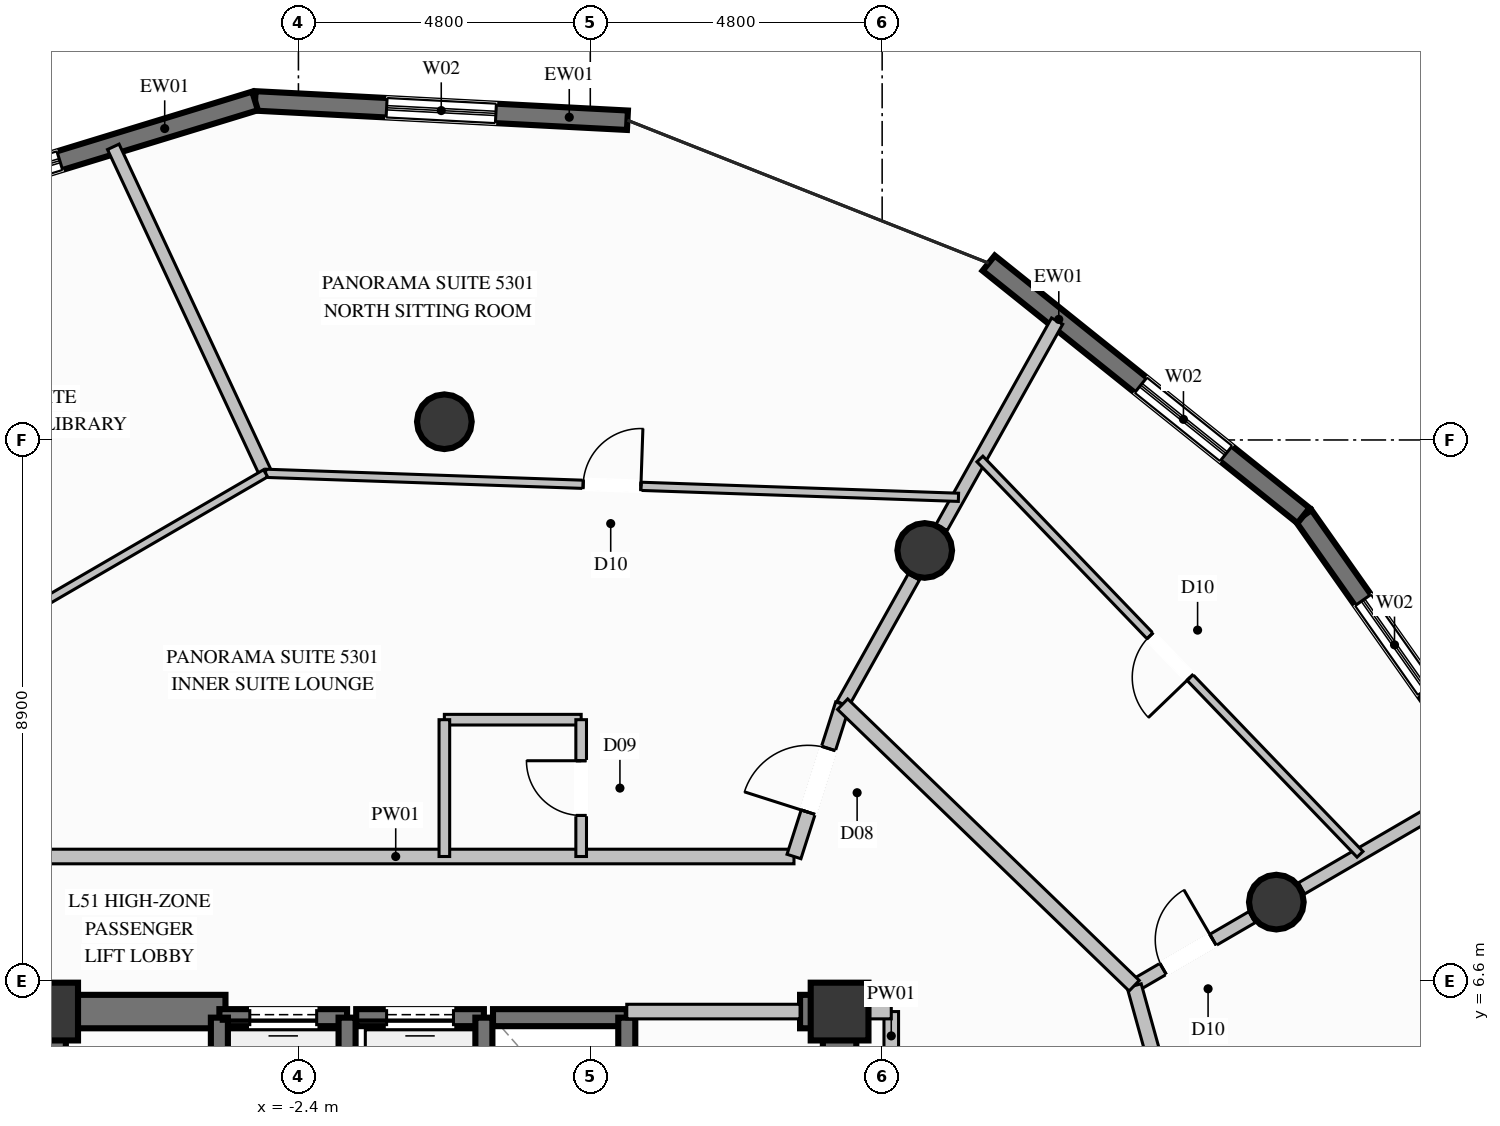
"""IFC4 building model, lengths in metres.
Left out: names, types, materials, properties, quantities, classifications, styles, units other than length and angle.
Written with IfcOpenShell. Run it as: python <this file> out.ifc"""

import sys

from ifc_helpers import new_model, si_unit, direction, frame, frame_2d, origin, origin_2d, place, context, subcontext, project, spatial, rectangle, circle, extrude, element, fill, save


model = new_model("IFC4")
c1 = context("Model", 3, precision=1e-05, world=origin(), true_north=direction((0.0, 1.0)))
c2 = subcontext(c1, "Body", "Model", "MODEL_VIEW")
j1 = project(units=[si_unit("LENGTHUNIT", "METRE"), si_unit("PLANEANGLEUNIT", "RADIAN")], contexts=[c1])
p1 = place(None, origin())
s1 = spatial("IfcSite", under=j1, at=p1, CompositionType="ELEMENT")
p2 = place(p1, origin())
s2 = spatial("IfcBuilding", under=s1, at=p2, CompositionType="ELEMENT")
p3 = place(p2, frame((0.0, 0.0, 198.4)))
s3 = spatial("IfcBuildingStorey", under=s2, at=p3, CompositionType="ELEMENT", Elevation=198.4)
for number, where, z_axis, x_axis in (
    (1, (6.5, 6.1, 0.0), (0.0, 0.0, 1.0), (1.0, 0.0, 0.0)),
    (2, (-6.5, 6.1, 0.0), (0.0, 0.0, 1.0), (1.0, 0.0, 0.0)),
):
    element("IfcColumn", number, at=place(p3, frame(where, z_axis=z_axis, x_axis=x_axis)), inside=s3, PredefinedType="COLUMN", context=c2, shape_type="SweptSolid", body=[
        extrude(rectangle(XDim=0.95, YDim=0.95, at=origin_2d()), origin(), (0.0, 0.0, 1.0), 3.6),
    ])
p4 = place(p3, frame((-6.225, 6.1, 0.0), z_axis=(0.0, 0.0, 1.0), x_axis=(1.0, 0.0, 0.0)))
e3 = element("IfcWall", 3, at=p4, inside=s3, PredefinedType="SHEAR", context=c2, shape_type="SweptSolid", body=[
    extrude(rectangle(XDim=2.625, YDim=0.55, at=frame_2d((1.312, 0.0))), origin(), (0.0, 0.0, 1.0), 3.6),
])
p5 = place(p3, frame((5.85, 6.1, 0.0), z_axis=(0.0, 0.0, 1.0), x_axis=(1.0, 0.0, 0.0)))
e4 = element("IfcWall", 4, at=p5, inside=s3, PredefinedType="SHEAR", context=c2, shape_type="SweptSolid", body=[
    extrude(rectangle(XDim=0.375, YDim=0.55, at=frame_2d((0.188, 0.0))), origin(), (0.0, 0.0, 1.0), 3.6),
])
p6 = place(p3, frame((-6.5, 2.35, 0.0), z_axis=(0.0, 0.0, 1.0), x_axis=(0.0, 1.0, 0.0)))
e5 = element("IfcWall", 5, at=p6, inside=s3, PredefinedType="SHEAR", context=c2, shape_type="SweptSolid", body=[
    extrude(rectangle(XDim=4.025, YDim=0.55, at=frame_2d((2.012, 0.0))), origin(), (0.0, 0.0, 1.0), 3.6),
])
p7 = place(p3, frame((6.5, 3.35, 0.0), z_axis=(0.0, 0.0, 1.0), x_axis=(0.0, 1.0, 0.0)))
e6 = element("IfcWall", 6, at=p7, inside=s3, PredefinedType="SHEAR", context=c2, shape_type="SweptSolid", body=[
    extrude(rectangle(XDim=3.025, YDim=0.55, at=frame_2d((1.512, 0.0))), origin(), (0.0, 0.0, 1.0), 3.6),
])
for number, where, z_axis, x_axis in (
    (7, (13.683, 7.9, 0.0), (0.0, 0.0, 1.0), (1.0, 0.0, 0.0)),
    (8, (7.9, 13.683, 0.0), (0.0, 0.0, 1.0), (1.0, 0.0, 0.0)),
    (9, (0.0, 15.8, 0.0), (0.0, 0.0, 1.0), (1.0, 0.0, 0.0)),
):
    element("IfcColumn", number, at=place(p3, frame(where, z_axis=z_axis, x_axis=x_axis)), inside=s3, PredefinedType="COLUMN", context=c2, shape_type="SweptSolid", body=[
        extrude(circle(Radius=0.45, at=origin_2d()), origin(), (0.0, 0.0, 1.0), 3.6),
    ])
p8 = place(p3, frame((14.13, 14.256, 0.0), z_axis=(0.0, 0.0, 1.0), x_axis=(0.575790136357, -0.817597528662, 0.0)))
e10 = element("IfcWall", 10, at=p8, inside=s3, PredefinedType="SOLIDWALL", context=c2, shape_type="SweptSolid", body=[
    extrude(rectangle(XDim=6.786, YDim=0.32, at=frame_2d((3.393, 0.0))), origin(), (0.0, 0.0, 1.0), 3.36),
])
p9 = place(p8, frame((1.699, 0.0, 0.35)))
e11 = element("IfcOpeningElement", 11, at=p9, cuts=e10, PredefinedType="OPENING", context=c2, shape_type="SweptSolid", body=[
    extrude(rectangle(XDim=1.8, YDim=2.6, at=frame_2d((0.9, 1.3))), frame((0.0, 0.17, 0.0), z_axis=(0.0, -1.0, 0.0), x_axis=(1.0, 0.0, 0.0)), (0.0, 0.0, 1.0), 0.34),
])
p10 = place(p3, frame((8.952, 18.408, 0.0), z_axis=(0.0, 0.0, 1.0), x_axis=(0.780172101925, -0.625564937778, 0.0)))
e12 = element("IfcWall", 12, at=p10, inside=s3, PredefinedType="SOLIDWALL", context=c2, shape_type="SweptSolid", body=[
    extrude(rectangle(XDim=6.637, YDim=0.32, at=frame_2d((3.318, 0.0))), origin(), (0.0, 0.0, 1.0), 3.36),
])
p11 = place(p10, frame((3.206, 0.0, 0.35)))
e13 = element("IfcOpeningElement", 13, at=p11, cuts=e12, PredefinedType="OPENING", context=c2, shape_type="SweptSolid", body=[
    extrude(rectangle(XDim=1.8, YDim=2.6, at=frame_2d((0.9, 1.3))), frame((0.0, 0.17, 0.0), z_axis=(0.0, -1.0, 0.0), x_axis=(1.0, 0.0, 0.0)), (0.0, 0.0, 1.0), 0.34),
])
p12 = place(p3, frame((-3.113, 21.076, 0.0), z_axis=(0.0, 0.0, 1.0), x_axis=(0.998655620393, -0.051835816367, 0.0)))
e14 = element("IfcWall", 14, at=p12, inside=s3, PredefinedType="SOLIDWALL", context=c2, shape_type="SweptSolid", body=[
    extrude(rectangle(XDim=6.132, YDim=0.32, at=frame_2d((3.066, 0.0))), origin(), (0.0, 0.0, 1.0), 3.36),
])
p13 = place(p12, frame((2.166, 0.0, 0.35)))
e15 = element("IfcOpeningElement", 15, at=p13, cuts=e14, PredefinedType="OPENING", context=c2, shape_type="SweptSolid", body=[
    extrude(rectangle(XDim=1.8, YDim=2.6, at=frame_2d((0.9, 1.3))), frame((0.0, 0.17, 0.0), z_axis=(0.0, -1.0, 0.0), x_axis=(1.0, 0.0, 0.0)), (0.0, 0.0, 1.0), 0.34),
])
p14 = place(p3, frame((-8.819, 19.331, 0.0), z_axis=(0.0, 0.0, 1.0), x_axis=(0.956288023308, 0.292426429171, 0.0)))
e16 = element("IfcWall", 16, at=p14, inside=s3, PredefinedType="SOLIDWALL", context=c2, shape_type="SweptSolid", body=[
    extrude(rectangle(XDim=5.967, YDim=0.32, at=frame_2d((2.983, 0.0))), origin(), (0.0, 0.0, 1.0), 3.36),
])
p15 = place(p14, frame((0.808, 0.0, 0.35)))
e17 = element("IfcOpeningElement", 17, at=p15, cuts=e16, PredefinedType="OPENING", context=c2, shape_type="SweptSolid", body=[
    extrude(rectangle(XDim=1.8, YDim=2.6, at=frame_2d((0.9, 1.3))), frame((0.0, 0.17, 0.0), z_axis=(0.0, -1.0, 0.0), x_axis=(1.0, 0.0, 0.0)), (0.0, 0.0, 1.0), 0.34),
])
p16 = place(p3, frame((-1.6, 6.0, 0.0), z_axis=(0.0, 0.0, 1.0), x_axis=(-1.0, 0.0, 0.0)))
e18 = element("IfcWall", 18, at=p16, inside=s3, PredefinedType="SOLIDWALL", context=c2, shape_type="SweptSolid", body=[
    extrude(rectangle(XDim=2.1, YDim=0.28, at=frame_2d((1.05, 0.0))), origin(), (0.0, 0.0, 1.0), 3.36),
])
p17 = place(p16, frame((0.5, 0.0, 0.0)))
e19 = element("IfcOpeningElement", 19, at=p17, cuts=e18, PredefinedType="OPENING", context=c2, shape_type="SweptSolid", body=[
    extrude(rectangle(XDim=1.1, YDim=2.2, at=frame_2d((0.55, 1.1))), frame((0.0, 0.15, 0.0), z_axis=(0.0, -1.0, 0.0), x_axis=(1.0, 0.0, 0.0)), (0.0, 0.0, 1.0), 0.3),
])
for number, where, z_axis, x_axis in (
    (20, (-3.7, 6.0, 0.0), (0.0, 0.0, 1.0), (0.0, -1.0, 0.0)),
    (21, (-1.6, 3.5, 0.0), (0.0, 0.0, 1.0), (0.0, 1.0, 0.0)),
):
    element("IfcWall", number, at=place(p3, frame(where, z_axis=z_axis, x_axis=x_axis)), inside=s3, PredefinedType="SOLIDWALL", context=c2, shape_type="SweptSolid", body=[
        extrude(rectangle(XDim=2.5, YDim=0.28, at=frame_2d((1.25, 0.0))), origin(), (0.0, 0.0, 1.0), 3.36),
    ])
p18 = place(p3, frame((0.65, 6.0, 0.0), z_axis=(0.0, 0.0, 1.0), x_axis=(-1.0, 0.0, 0.0)))
e22 = element("IfcWall", 22, at=p18, inside=s3, PredefinedType="SOLIDWALL", context=c2, shape_type="SweptSolid", body=[
    extrude(rectangle(XDim=2.1, YDim=0.28, at=frame_2d((1.05, 0.0))), origin(), (0.0, 0.0, 1.0), 3.36),
])
p19 = place(p18, frame((0.5, 0.0, 0.0)))
e23 = element("IfcOpeningElement", 23, at=p19, cuts=e22, PredefinedType="OPENING", context=c2, shape_type="SweptSolid", body=[
    extrude(rectangle(XDim=1.1, YDim=2.2, at=frame_2d((0.55, 1.1))), frame((0.0, 0.15, 0.0), z_axis=(0.0, -1.0, 0.0), x_axis=(1.0, 0.0, 0.0)), (0.0, 0.0, 1.0), 0.3),
])
p20 = place(p3, frame((0.65, 3.5, 0.0), z_axis=(0.0, 0.0, 1.0), x_axis=(0.0, 1.0, 0.0)))
e24 = element("IfcWall", 24, at=p20, inside=s3, PredefinedType="SOLIDWALL", context=c2, shape_type="SweptSolid", body=[
    extrude(rectangle(XDim=2.5, YDim=0.28, at=frame_2d((1.25, 0.0))), origin(), (0.0, 0.0, 1.0), 3.36),
])
p21 = place(p3, frame((3.0, 6.0, 0.0), z_axis=(0.0, 0.0, 1.0), x_axis=(-1.0, 0.0, 0.0)))
e25 = element("IfcWall", 25, at=p21, inside=s3, PredefinedType="SOLIDWALL", context=c2, shape_type="SweptSolid", body=[
    extrude(rectangle(XDim=2.2, YDim=0.28, at=frame_2d((1.1, 0.0))), origin(), (0.0, 0.0, 1.0), 3.36),
])
p22 = place(p3, frame((3.0, 3.5, 0.0), z_axis=(0.0, 0.0, 1.0), x_axis=(0.0, 1.0, 0.0)))
e26 = element("IfcWall", 26, at=p22, inside=s3, PredefinedType="SOLIDWALL", context=c2, shape_type="SweptSolid", body=[
    extrude(rectangle(XDim=2.5, YDim=0.28, at=frame_2d((1.25, 0.0))), origin(), (0.0, 0.0, 1.0), 3.36),
])
p23 = place(p3, frame((-7.35, 8.65, 0.0), z_axis=(0.0, 0.0, 1.0), x_axis=(1.0, 0.0, 0.0)))
e27 = element("IfcWall", 27, at=p23, inside=s3, PredefinedType="PARTITIONING", context=c2, shape_type="SweptSolid", body=[
    extrude(rectangle(XDim=13.1, YDim=0.24, at=frame_2d((6.55, 0.0))), origin(), (0.0, 0.0, 1.0), 3.36),
])
p24 = place(p3, frame((3.0, 6.1, 0.0), z_axis=(0.0, 0.0, 1.0), x_axis=(1.0, 0.0, 0.0)))
e28 = element("IfcWall", 28, at=p24, inside=s3, PredefinedType="PARTITIONING", context=c2, shape_type="SweptSolid", body=[
    extrude(rectangle(XDim=2.85, YDim=0.24, at=frame_2d((1.425, 0.0))), origin(), (0.0, 0.0, 1.0), 2.445),
])
p25 = place(p3, frame((7.35, 5.3, 0.0), z_axis=(0.0, 0.0, 1.0), x_axis=(0.0, 1.0, 0.0)))
e29 = element("IfcWall", 29, at=p25, inside=s3, PredefinedType="PARTITIONING", context=c2, shape_type="SweptSolid", body=[
    extrude(rectangle(XDim=0.8, YDim=0.24, at=frame_2d((0.4, 0.0))), origin(), (0.0, 0.0, 1.0), 2.445),
])
p26 = place(p3, frame((6.5, 6.1, 0.0), z_axis=(0.0, 0.0, 1.0), x_axis=(1.0, 0.0, 0.0)))
e30 = element("IfcWall", 30, at=p26, inside=s3, PredefinedType="PARTITIONING", context=c2, shape_type="SweptSolid", body=[
    extrude(rectangle(XDim=0.85, YDim=0.24, at=frame_2d((0.425, 0.0))), origin(), (0.0, 0.0, 1.0), 2.876),
])
p27 = place(p3, frame((11.345, 6.525, 0.0), z_axis=(0.0, 0.0, 1.0), x_axis=(0.864228712324, 0.5030991282, 0.0)))
e31 = element("IfcWall", 31, at=p27, inside=s3, PredefinedType="PARTITIONING", context=c2, shape_type="SweptSolid", body=[
    extrude(rectangle(XDim=2.242, YDim=0.21, at=frame_2d((1.121, 0.0))), origin(), (0.0, 0.0, 1.0), 2.876),
])
p28 = place(p27, frame((0.55, 0.0, 0.0)))
e32 = element("IfcOpeningElement", 32, at=p28, cuts=e31, PredefinedType="OPENING", context=c2, shape_type="SweptSolid", body=[
    extrude(rectangle(XDim=0.95, YDim=2.1, at=frame_2d((0.475, 1.05))), frame((0.0, 0.115, 0.0), z_axis=(0.0, -1.0, 0.0), x_axis=(1.0, 0.0, 0.0)), (0.0, 0.0, 1.0), 0.23),
])
p29 = place(p3, frame((14.096, 8.125, 0.0), z_axis=(0.0, 0.0, 1.0), x_axis=(0.864327572571, 0.502929266689, 0.0)))
e33 = element("IfcWall", 33, at=p29, inside=s3, PredefinedType="PARTITIONING", context=c2, shape_type="SweptSolid", body=[
    extrude(rectangle(XDim=3.531, YDim=0.21, at=frame_2d((1.766, 0.0))), origin(), (0.0, 0.0, 1.0), 3.36),
])
p30 = place(p3, frame((6.55, 11.155, 0.0), z_axis=(0.0, 0.0, 1.0), x_axis=(0.488535184748, 0.872544195593, 0.0)))
e34 = element("IfcWall", 34, at=p30, inside=s3, PredefinedType="PARTITIONING", context=c2, shape_type="SweptSolid", body=[
    extrude(rectangle(XDim=2.399, YDim=0.21, at=frame_2d((1.199, 0.0))), origin(), (0.0, 0.0, 1.0), 2.876),
])
p31 = place(p3, frame((8.178, 14.062, 0.0), z_axis=(0.0, 0.0, 1.0), x_axis=(0.488561310484, 0.872529567349, 0.0)))
e35 = element("IfcWall", 35, at=p31, inside=s3, PredefinedType="PARTITIONING", context=c2, shape_type="SweptSolid", body=[
    extrude(rectangle(XDim=3.889, YDim=0.21, at=frame_2d((1.944, 0.0))), origin(), (0.0, 0.0, 1.0), 3.36),
])
p32 = place(p3, frame((0.0, 10.9, 0.0), z_axis=(0.0, 0.0, 1.0), x_axis=(1.0, 0.0, 0.0)))
e36 = element("IfcWall", 36, at=p32, inside=s3, PredefinedType="PLUMBINGWALL", context=c2, shape_type="SweptSolid", body=[
    extrude(rectangle(XDim=2.25, YDim=0.175, at=frame_2d((1.125, 0.0))), origin(), (0.0, 0.0, 1.0), 3.042),
])
p33 = place(p3, frame((0.0, 10.9, 0.0), z_axis=(0.0, 0.0, 1.0), x_axis=(0.0, -1.0, 0.0)))
e37 = element("IfcWall", 37, at=p33, inside=s3, PredefinedType="PLUMBINGWALL", context=c2, shape_type="SweptSolid", body=[
    extrude(rectangle(XDim=2.25, YDim=0.175, at=frame_2d((1.125, 0.0))), origin(), (0.0, 0.0, 1.0), 3.36),
])
p34 = place(p3, frame((2.25, 8.65, 0.0), z_axis=(0.0, 0.0, 1.0), x_axis=(0.0, 1.0, 0.0)))
e38 = element("IfcWall", 38, at=p34, inside=s3, PredefinedType="PLUMBINGWALL", context=c2, shape_type="SweptSolid", body=[
    extrude(rectangle(XDim=2.25, YDim=0.175, at=frame_2d((1.125, 0.0))), origin(), (0.0, 0.0, 1.0), 3.36),
])
p35 = place(p34, frame((0.675, 0.0, 0.0)))
e39 = element("IfcOpeningElement", 39, at=p35, cuts=e38, PredefinedType="OPENING", context=c2, shape_type="SweptSolid", body=[
    extrude(rectangle(XDim=0.9, YDim=2.1, at=frame_2d((0.45, 1.05))), frame((0.0, 0.098, 0.0), z_axis=(0.0, -1.0, 0.0), x_axis=(1.0, 0.0, 0.0)), (0.0, 0.0, 1.0), 0.195),
])
p36 = place(p3, frame((5.75, 8.65, 0.0), z_axis=(0.0, 0.0, 1.0), x_axis=(0.304226604656, 0.952599691906, 0.0)))
e40 = element("IfcWall", 40, at=p36, inside=s3, PredefinedType="PARTITIONING", context=c2, shape_type="SweptSolid", body=[
    extrude(rectangle(XDim=2.63, YDim=0.24, at=frame_2d((1.315, 0.0))), origin(), (0.0, 0.0, 1.0), 3.36),
])
p37 = place(p36, frame((0.765, 0.0, 0.0)))
e41 = element("IfcOpeningElement", 41, at=p37, cuts=e40, PredefinedType="OPENING", context=c2, shape_type="SweptSolid", body=[
    extrude(rectangle(XDim=1.1, YDim=2.3, at=frame_2d((0.55, 1.15))), frame((0.0, 0.13, 0.0), z_axis=(0.0, -1.0, 0.0), x_axis=(1.0, 0.0, 0.0)), (0.0, 0.0, 1.0), 0.26),
])
p38 = place(p3, frame((-2.94, 14.952, 0.0), z_axis=(0.0, 0.0, 1.0), x_axis=(-0.422820045128, 0.906213666548, 0.0)))
e42 = element("IfcWall", 42, at=p38, inside=s3, PredefinedType="PARTITIONING", context=c2, shape_type="SweptSolid", body=[
    extrude(rectangle(XDim=5.925, YDim=0.21, at=frame_2d((2.962, 0.0))), origin(), (0.0, 0.0, 1.0), 3.36),
])
p39 = place(p3, frame((-2.94, 14.952, 0.0), z_axis=(0.0, 0.0, 1.0), x_axis=(0.999399675895, -0.034645170236, 0.0)))
e43 = element("IfcWall", 43, at=p39, inside=s3, PredefinedType="PARTITIONING", context=c2, shape_type="SweptSolid", body=[
    extrude(rectangle(XDim=11.402, YDim=0.135, at=frame_2d((5.701, 0.0))), origin(), (0.0, 0.0, 1.0), 2.929),
])
p40 = place(p39, frame((5.226, 0.0, 0.0)))
e44 = element("IfcOpeningElement", 44, at=p40, cuts=e43, PredefinedType="OPENING", context=c2, shape_type="SweptSolid", body=[
    extrude(rectangle(XDim=0.95, YDim=2.1, at=frame_2d((0.475, 1.05))), frame((0.0, 0.078, 0.0), z_axis=(0.0, -1.0, 0.0), x_axis=(1.0, 0.0, 0.0)), (0.0, 0.0, 1.0), 0.155),
])
p41 = place(p3, frame((-14.387, 8.295, 0.0), z_axis=(0.0, 0.0, 1.0), x_axis=(0.864450171357, 0.502718510939, 0.0)))
e45 = element("IfcWall", 45, at=p41, inside=s3, PredefinedType="PARTITIONING", context=c2, shape_type="SweptSolid", body=[
    extrude(rectangle(XDim=13.242, YDim=0.135, at=frame_2d((6.621, 0.0))), origin(), (0.0, 0.0, 1.0), 2.929),
])
p42 = place(p41, frame((6.146, 0.0, 0.0)))
e46 = element("IfcOpeningElement", 46, at=p42, cuts=e45, PredefinedType="OPENING", context=c2, shape_type="SweptSolid", body=[
    extrude(rectangle(XDim=0.95, YDim=2.1, at=frame_2d((0.475, 1.05))), frame((0.0, 0.078, 0.0), z_axis=(0.0, -1.0, 0.0), x_axis=(1.0, 0.0, 0.0)), (0.0, 0.0, 1.0), 0.155),
])
p43 = place(p3, frame((13.1, 0.2, 0.0), z_axis=(0.0, 0.0, 1.0), x_axis=(-0.26738871748, 0.963588747218, 0.0)))
e47 = element("IfcWall", 47, at=p43, inside=s3, PredefinedType="PARTITIONING", context=c2, shape_type="SweptSolid", body=[
    extrude(rectangle(XDim=6.564, YDim=0.24, at=frame_2d((3.282, 0.0))), origin(), (0.0, 0.0, 1.0), 3.36),
])
p44 = place(p3, frame((11.345, 6.525, 0.0), z_axis=(0.0, 0.0, 1.0), x_axis=(-0.719360436772, 0.694637000172, 0.0)))
e48 = element("IfcWall", 48, at=p44, inside=s3, PredefinedType="PARTITIONING", context=c2, shape_type="SweptSolid", body=[
    extrude(rectangle(XDim=6.666, YDim=0.24, at=frame_2d((3.333, 0.0))), origin(), (0.0, 0.0, 1.0), 3.36),
])
p45 = place(p3, frame((15.059, 8.686, 0.0), z_axis=(0.0, 0.0, 1.0), x_axis=(-0.693110880217, 0.72083098416, 0.0)))
e49 = element("IfcWall", 49, at=p45, inside=s3, PredefinedType="PARTITIONING", context=c2, shape_type="SweptSolid", body=[
    extrude(rectangle(XDim=9.019, YDim=0.135, at=frame_2d((4.509, 0.0))), origin(), (0.0, 0.0, 1.0), 3.36),
])
p46 = place(p45, frame((4.034, 0.0, 0.0)))
e50 = element("IfcOpeningElement", 50, at=p46, cuts=e49, PredefinedType="OPENING", context=c2, shape_type="SweptSolid", body=[
    extrude(rectangle(XDim=0.95, YDim=2.1, at=frame_2d((0.475, 1.05))), frame((0.0, 0.078, 0.0), z_axis=(0.0, -1.0, 0.0), x_axis=(1.0, 0.0, 0.0)), (0.0, 0.0, 1.0), 0.155),
])
p47 = place(p9, origin())
e51 = element("IfcWindow", 51, at=p47, inside=s3, PartitioningType="SINGLE_PANEL", PredefinedType="WINDOW", context=c2, shape_type="SweptSolid", body=[
    extrude(rectangle(XDim=1.8, YDim=2.6, at=frame_2d((0.9, 1.3))), frame((0.0, 0.03, 0.0), z_axis=(0.0, -1.0, 0.0), x_axis=(1.0, 0.0, 0.0)), (0.0, 0.0, 1.0), 0.06),
])
fill(e11, e51)
p48 = place(p11, origin())
e52 = element("IfcWindow", 52, at=p48, inside=s3, PartitioningType="SINGLE_PANEL", PredefinedType="WINDOW", context=c2, shape_type="SweptSolid", body=[
    extrude(rectangle(XDim=1.8, YDim=2.6, at=frame_2d((0.9, 1.3))), frame((0.0, 0.03, 0.0), z_axis=(0.0, -1.0, 0.0), x_axis=(1.0, 0.0, 0.0)), (0.0, 0.0, 1.0), 0.06),
])
fill(e13, e52)
p49 = place(p13, origin())
e53 = element("IfcWindow", 53, at=p49, inside=s3, PartitioningType="SINGLE_PANEL", PredefinedType="WINDOW", context=c2, shape_type="SweptSolid", body=[
    extrude(rectangle(XDim=1.8, YDim=2.6, at=frame_2d((0.9, 1.3))), frame((0.0, 0.03, 0.0), z_axis=(0.0, -1.0, 0.0), x_axis=(1.0, 0.0, 0.0)), (0.0, 0.0, 1.0), 0.06),
])
fill(e15, e53)
p50 = place(p15, origin())
e54 = element("IfcWindow", 54, at=p50, inside=s3, PartitioningType="SINGLE_PANEL", PredefinedType="WINDOW", context=c2, shape_type="SweptSolid", body=[
    extrude(rectangle(XDim=1.8, YDim=2.6, at=frame_2d((0.9, 1.3))), frame((0.0, 0.03, 0.0), z_axis=(0.0, -1.0, 0.0), x_axis=(1.0, 0.0, 0.0)), (0.0, 0.0, 1.0), 0.06),
])
fill(e17, e54)
p51 = place(p17, origin())
e55 = element("IfcDoor", 55, at=p51, inside=s3, OperationType="SLIDING_TO_LEFT", PredefinedType="DOOR", context=c2, shape_type="SweptSolid", body=[
    extrude(rectangle(XDim=1.1, YDim=2.2, at=frame_2d((0.55, 1.1))), frame((0.0, 0.025, 0.0), z_axis=(0.0, -1.0, 0.0), x_axis=(1.0, 0.0, 0.0)), (0.0, 0.0, 1.0), 0.05),
])
fill(e19, e55)
p52 = place(p19, origin())
e56 = element("IfcDoor", 56, at=p52, inside=s3, OperationType="SLIDING_TO_LEFT", PredefinedType="DOOR", context=c2, shape_type="SweptSolid", body=[
    extrude(rectangle(XDim=1.1, YDim=2.2, at=frame_2d((0.55, 1.1))), frame((0.0, 0.025, 0.0), z_axis=(0.0, -1.0, 0.0), x_axis=(1.0, 0.0, 0.0)), (0.0, 0.0, 1.0), 0.05),
])
fill(e23, e56)
p53 = place(p35, origin())
e57 = element("IfcDoor", 57, at=p53, inside=s3, OperationType="SINGLE_SWING_RIGHT", PredefinedType="DOOR", context=c2, shape_type="SweptSolid", body=[
    extrude(rectangle(XDim=0.9, YDim=2.1, at=frame_2d((0.45, 1.05))), frame((0.0, 0.025, 0.0), z_axis=(0.0, -1.0, 0.0), x_axis=(1.0, 0.0, 0.0)), (0.0, 0.0, 1.0), 0.05),
])
fill(e39, e57)
p54 = place(p37, origin())
e58 = element("IfcDoor", 58, at=p54, inside=s3, OperationType="SINGLE_SWING_LEFT", PredefinedType="DOOR", context=c2, shape_type="SweptSolid", body=[
    extrude(rectangle(XDim=1.1, YDim=2.3, at=frame_2d((0.55, 1.15))), frame((0.0, 0.025, 0.0), z_axis=(0.0, -1.0, 0.0), x_axis=(1.0, 0.0, 0.0)), (0.0, 0.0, 1.0), 0.05),
])
fill(e41, e58)
p55 = place(p40, origin())
e59 = element("IfcDoor", 59, at=p55, inside=s3, OperationType="SINGLE_SWING_RIGHT", PredefinedType="DOOR", context=c2, shape_type="SweptSolid", body=[
    extrude(rectangle(XDim=0.95, YDim=2.1, at=frame_2d((0.475, 1.05))), frame((0.0, 0.025, 0.0), z_axis=(0.0, -1.0, 0.0), x_axis=(1.0, 0.0, 0.0)), (0.0, 0.0, 1.0), 0.05),
])
fill(e44, e59)
p56 = place(p28, origin())
e60 = element("IfcDoor", 60, at=p56, inside=s3, OperationType="SINGLE_SWING_RIGHT", PredefinedType="DOOR", context=c2, shape_type="SweptSolid", body=[
    extrude(rectangle(XDim=0.95, YDim=2.1, at=frame_2d((0.475, 1.05))), frame((0.0, 0.025, 0.0), z_axis=(0.0, -1.0, 0.0), x_axis=(1.0, 0.0, 0.0)), (0.0, 0.0, 1.0), 0.05),
])
fill(e32, e60)
p57 = place(p46, origin())
e61 = element("IfcDoor", 61, at=p57, inside=s3, OperationType="SINGLE_SWING_LEFT", PredefinedType="DOOR", context=c2, shape_type="SweptSolid", body=[
    extrude(rectangle(XDim=0.95, YDim=2.1, at=frame_2d((0.475, 1.05))), frame((0.0, 0.025, 0.0), z_axis=(0.0, -1.0, 0.0), x_axis=(1.0, 0.0, 0.0)), (0.0, 0.0, 1.0), 0.05),
])
fill(e50, e61)
save(model, sys.argv[1])
